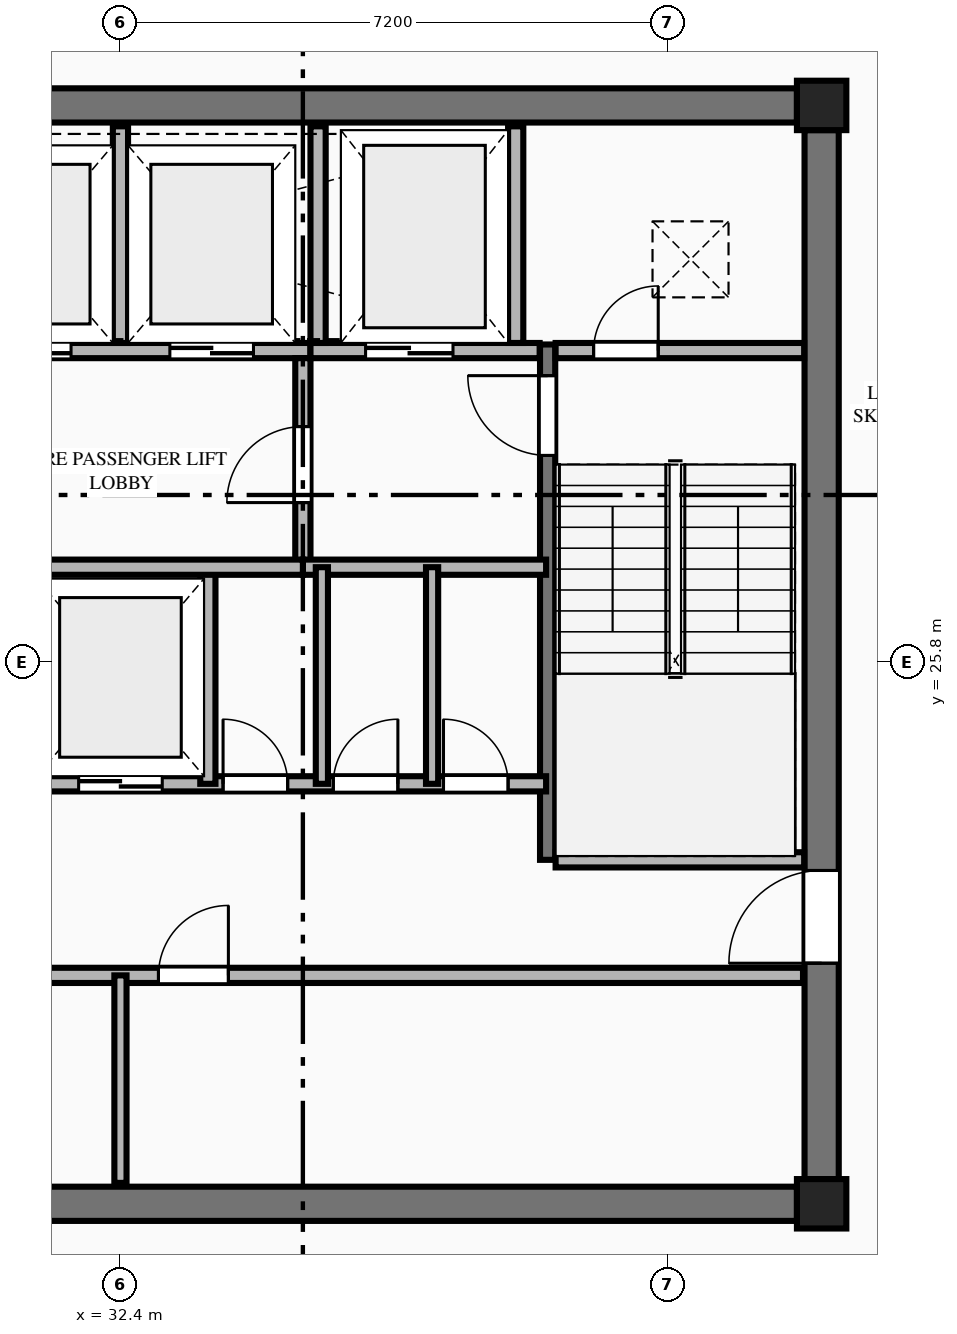
"""IFC4 building model, lengths in metres.
Left out: names, types, materials, properties, quantities, classifications, styles, units other than length and angle.
Written with IfcOpenShell. Run it as: python <this file> out.ifc"""

import sys

from ifc_helpers import new_model, si_unit, direction, frame, frame_2d, origin, origin_2d, place, context, subcontext, project, spatial, rectangle, extrude, element, fill, save


model = new_model("IFC4")
c1 = context("Model", 3, precision=1e-05, world=origin(), true_north=direction((0.0, 1.0)))
c2 = subcontext(c1, "Body", "Model", "MODEL_VIEW")
j1 = project(units=[si_unit("LENGTHUNIT", "METRE"), si_unit("PLANEANGLEUNIT", "RADIAN")], contexts=[c1])
p1 = place(None, origin())
s1 = spatial("IfcSite", under=j1, at=p1, CompositionType="ELEMENT")
p2 = place(p1, origin())
s2 = spatial("IfcBuilding", under=s1, at=p2, CompositionType="ELEMENT")
p3 = place(p2, frame((0.0, 0.0, 270.8)))
s3 = spatial("IfcBuildingStorey", under=s2, at=p3, CompositionType="ELEMENT", Elevation=270.8)
for number, where, z_axis, x_axis in (
    (1, (41.625, 18.675, 0.0), (0.0, 0.0, 1.0), (1.0, 0.0, 0.0)),
    (2, (41.625, 33.125, 0.0), (0.0, 0.0, 1.0), (1.0, 0.0, 0.0)),
):
    element("IfcColumn", number, at=place(p3, frame(where, z_axis=z_axis, x_axis=x_axis)), inside=s3, PredefinedType="COLUMN", context=c2, shape_type="SweptSolid", body=[
        extrude(rectangle(XDim=0.65, YDim=0.65, at=origin_2d()), origin(), (0.0, 0.0, 1.0), 3.65),
    ])
for number, where, z_axis, x_axis in (
    (3, (23.5, 18.675, 0.0), (0.0, 0.0, 1.0), (1.0, 0.0, 0.0)),
    (4, (23.5, 33.125, 0.0), (0.0, 0.0, 1.0), (1.0, 0.0, 0.0)),
):
    element("IfcWall", number, at=place(p3, frame(where, z_axis=z_axis, x_axis=x_axis)), inside=s3, PredefinedType="SHEAR", context=c2, shape_type="SweptSolid", body=[
        extrude(rectangle(XDim=17.8, YDim=0.45, at=frame_2d((8.9, 0.0))), origin(), (0.0, 0.0, 1.0), 3.45),
    ])
p4 = place(p3, frame((41.625, 19.0, 0.0), z_axis=(0.0, 0.0, 1.0), x_axis=(0.0, 1.0, 0.0)))
e5 = element("IfcWall", 5, at=p4, inside=s3, PredefinedType="SHEAR", context=c2, shape_type="SweptSolid", body=[
    extrude(rectangle(XDim=13.8, YDim=0.45, at=frame_2d((6.9, 0.0))), origin(), (0.0, 0.0, 1.0), 3.45),
])
p5 = place(p4, frame((2.84, 0.0, 0.0)))
e6 = element("IfcOpeningElement", 6, at=p5, cuts=e5, PredefinedType="OPENING", context=c2, shape_type="SweptSolid", body=[
    extrude(rectangle(XDim=1.22, YDim=2.25, at=frame_2d((0.61, 1.125))), frame((0.0, 0.235, 0.0), z_axis=(0.0, -1.0, 0.0), x_axis=(1.0, 0.0, 0.0)), (0.0, 0.0, 1.0), 0.47),
])
p6 = place(p3, frame((38.02, 23.2, 0.0), z_axis=(0.0, 0.0, 1.0), x_axis=(0.0, 1.0, 0.0)))
e7 = element("IfcWall", 7, at=p6, inside=s3, PredefinedType="SHEAR", context=c2, shape_type="SweptSolid", body=[
    extrude(rectangle(XDim=6.78, YDim=0.2, at=frame_2d((3.39, 0.0))), origin(), (0.0, 0.0, 1.0), 3.65),
])
p7 = place(p6, frame((5.32, 0.0, 0.0)))
e8 = element("IfcOpeningElement", 8, at=p7, cuts=e7, PredefinedType="OPENING", context=c2, shape_type="SweptSolid", body=[
    extrude(rectangle(XDim=1.05, YDim=2.15, at=frame_2d((0.525, 1.075))), frame((0.0, 0.11, 0.0), z_axis=(0.0, -1.0, 0.0), x_axis=(1.0, 0.0, 0.0)), (0.0, 0.0, 1.0), 0.22),
])
p8 = place(p3, frame((38.125, 23.2, 0.0), z_axis=(0.0, 0.0, 1.0), x_axis=(1.0, 0.0, 0.0)))
e9 = element("IfcWall", 9, at=p8, inside=s3, PredefinedType="PLUMBINGWALL", context=c2, shape_type="SweptSolid", body=[
    extrude(rectangle(XDim=3.27, YDim=0.2, at=frame_2d((1.635, 0.0))), origin(), (0.0, 0.0, 1.0), 3.45),
])
p9 = place(p3, frame((29.9, 29.9, 0.0), z_axis=(0.0, 0.0, 1.0), x_axis=(1.0, 0.0, 0.0)))
e10 = element("IfcWall", 10, at=p9, inside=s3, PredefinedType="PLUMBINGWALL", context=c2, shape_type="SweptSolid", body=[
    extrude(rectangle(XDim=5.0, YDim=0.2, at=frame_2d((2.5, 0.0))), origin(), (0.0, 0.0, 1.0), 3.45),
])
p10 = place(p9, frame((0.75, 0.0, 0.0)))
e11 = element("IfcOpeningElement", 11, at=p10, cuts=e10, PredefinedType="OPENING", context=c2, shape_type="SweptSolid", body=[
    extrude(rectangle(XDim=1.1, YDim=2.2, at=frame_2d((0.55, 1.1))), frame((0.0, 0.11, 0.0), z_axis=(0.0, -1.0, 0.0), x_axis=(1.0, 0.0, 0.0)), (0.0, 0.0, 1.0), 0.22),
])
p11 = place(p9, frame((3.15, 0.0, 0.0)))
e12 = element("IfcOpeningElement", 12, at=p11, cuts=e10, PredefinedType="OPENING", context=c2, shape_type="SweptSolid", body=[
    extrude(rectangle(XDim=1.1, YDim=2.2, at=frame_2d((0.55, 1.1))), frame((0.0, 0.11, 0.0), z_axis=(0.0, -1.0, 0.0), x_axis=(1.0, 0.0, 0.0)), (0.0, 0.0, 1.0), 0.22),
])
p12 = place(p3, frame((34.9, 29.9, 0.0), z_axis=(0.0, 0.0, 1.0), x_axis=(1.0, 0.0, 0.0)))
e13 = element("IfcWall", 13, at=p12, inside=s3, PredefinedType="PLUMBINGWALL", context=c2, shape_type="SweptSolid", body=[
    extrude(rectangle(XDim=3.015, YDim=0.2, at=frame_2d((1.508, 0.0))), origin(), (0.0, 0.0, 1.0), 3.45),
])
p13 = place(p12, frame((0.725, 0.0, 0.0)))
e14 = element("IfcOpeningElement", 14, at=p13, cuts=e13, PredefinedType="OPENING", context=c2, shape_type="SweptSolid", body=[
    extrude(rectangle(XDim=1.15, YDim=2.2, at=frame_2d((0.575, 1.1))), frame((0.0, 0.11, 0.0), z_axis=(0.0, -1.0, 0.0), x_axis=(1.0, 0.0, 0.0)), (0.0, 0.0, 1.0), 0.22),
])
p14 = place(p3, frame((38.125, 29.9, 0.0), z_axis=(0.0, 0.0, 1.0), x_axis=(1.0, 0.0, 0.0)))
e15 = element("IfcWall", 15, at=p14, inside=s3, PredefinedType="PLUMBINGWALL", context=c2, shape_type="SweptSolid", body=[
    extrude(rectangle(XDim=3.27, YDim=0.2, at=frame_2d((1.635, 0.0))), origin(), (0.0, 0.0, 1.0), 3.45),
])
p15 = place(p14, frame((0.5, 0.0, 0.0)))
e16 = element("IfcOpeningElement", 16, at=p15, cuts=e15, PredefinedType="OPENING", context=c2, shape_type="SweptSolid", body=[
    extrude(rectangle(XDim=0.85, YDim=2.05, at=frame_2d((0.425, 1.025))), frame((0.0, 0.11, 0.0), z_axis=(0.0, -1.0, 0.0), x_axis=(1.0, 0.0, 0.0)), (0.0, 0.0, 1.0), 0.22),
])
for number, where, z_axis, x_axis in (
    (17, (32.4, 30.0, 0.0), (0.0, 0.0, 1.0), (0.0, 1.0, 0.0)),
    (18, (35.0, 30.0, 0.0), (0.0, 0.0, 1.0), (0.0, 1.0, 0.0)),
    (19, (37.6, 30.0, 0.0), (0.0, 0.0, 1.0), (0.0, 1.0, 0.0)),
):
    element("IfcWall", number, at=place(p3, frame(where, z_axis=z_axis, x_axis=x_axis)), inside=s3, PredefinedType="PLUMBINGWALL", context=c2, shape_type="SweptSolid", body=[
        extrude(rectangle(XDim=2.85, YDim=0.2, at=frame_2d((1.425, 0.0))), origin(), (0.0, 0.0, 1.0), 3.45),
    ])
p16 = place(p3, frame((34.8, 27.05, 0.0), z_axis=(0.0, 0.0, 1.0), x_axis=(0.0, 1.0, 0.0)))
e20 = element("IfcWall", 20, at=p16, inside=s3, PredefinedType="PLUMBINGWALL", context=c2, shape_type="SweptSolid", body=[
    extrude(rectangle(XDim=2.75, YDim=0.2, at=frame_2d((1.375, 0.0))), origin(), (0.0, 0.0, 1.0), 3.45),
])
p17 = place(p16, frame((0.85, 0.0, 0.0)))
e21 = element("IfcOpeningElement", 21, at=p17, cuts=e20, PredefinedType="OPENING", context=c2, shape_type="SweptSolid", body=[
    extrude(rectangle(XDim=1.0, YDim=2.15, at=frame_2d((0.5, 1.075))), frame((0.0, 0.11, 0.0), z_axis=(0.0, -1.0, 0.0), x_axis=(1.0, 0.0, 0.0)), (0.0, 0.0, 1.0), 0.22),
])
p18 = place(p3, frame((34.8, 27.05, 0.0), z_axis=(0.0, 0.0, 1.0), x_axis=(1.0, 0.0, 0.0)))
e22 = element("IfcWall", 22, at=p18, inside=s3, PredefinedType="PLUMBINGWALL", context=c2, shape_type="SweptSolid", body=[
    extrude(rectangle(XDim=3.2, YDim=0.2, at=frame_2d((1.6, 0.0))), origin(), (0.0, 0.0, 1.0), 3.45),
])
p19 = place(p3, frame((31.2, 24.2, 0.0), z_axis=(0.0, 0.0, 1.0), x_axis=(1.0, 0.0, 0.0)))
e23 = element("IfcWall", 23, at=p19, inside=s3, PredefinedType="PLUMBINGWALL", context=c2, shape_type="SweptSolid", body=[
    extrude(rectangle(XDim=6.8, YDim=0.2, at=frame_2d((3.4, 0.0))), origin(), (0.0, 0.0, 1.0), 3.45),
])
p20 = place(p19, frame((0.65, 0.0, 0.0)))
e24 = element("IfcOpeningElement", 24, at=p20, cuts=e23, PredefinedType="OPENING", context=c2, shape_type="SweptSolid", body=[
    extrude(rectangle(XDim=1.1, YDim=2.2, at=frame_2d((0.55, 1.1))), frame((0.0, 0.11, 0.0), z_axis=(0.0, -1.0, 0.0), x_axis=(1.0, 0.0, 0.0)), (0.0, 0.0, 1.0), 0.22),
])
p21 = place(p19, frame((2.55, 0.0, 0.0)))
e25 = element("IfcOpeningElement", 25, at=p21, cuts=e23, PredefinedType="OPENING", context=c2, shape_type="SweptSolid", body=[
    extrude(rectangle(XDim=0.85, YDim=2.05, at=frame_2d((0.425, 1.025))), frame((0.0, 0.11, 0.0), z_axis=(0.0, -1.0, 0.0), x_axis=(1.0, 0.0, 0.0)), (0.0, 0.0, 1.0), 0.22),
])
p22 = place(p19, frame((4.0, 0.0, 0.0)))
e26 = element("IfcOpeningElement", 26, at=p22, cuts=e23, PredefinedType="OPENING", context=c2, shape_type="SweptSolid", body=[
    extrude(rectangle(XDim=0.85, YDim=2.05, at=frame_2d((0.425, 1.025))), frame((0.0, 0.11, 0.0), z_axis=(0.0, -1.0, 0.0), x_axis=(1.0, 0.0, 0.0)), (0.0, 0.0, 1.0), 0.22),
])
p23 = place(p19, frame((5.45, 0.0, 0.0)))
e27 = element("IfcOpeningElement", 27, at=p23, cuts=e23, PredefinedType="OPENING", context=c2, shape_type="SweptSolid", body=[
    extrude(rectangle(XDim=0.85, YDim=2.05, at=frame_2d((0.425, 1.025))), frame((0.0, 0.11, 0.0), z_axis=(0.0, -1.0, 0.0), x_axis=(1.0, 0.0, 0.0)), (0.0, 0.0, 1.0), 0.22),
])
p24 = place(p3, frame((33.55, 24.2, 0.0), z_axis=(0.0, 0.0, 1.0), x_axis=(0.0, 1.0, 0.0)))
e28 = element("IfcWall", 28, at=p24, inside=s3, PredefinedType="PLUMBINGWALL", context=c2, shape_type="SweptSolid", body=[
    extrude(rectangle(XDim=2.85, YDim=0.2, at=frame_2d((1.425, 0.0))), origin(), (0.0, 0.0, 1.0), 3.45),
])
p25 = place(p3, frame((31.25, 27.05, 0.0), z_axis=(0.0, 0.0, 1.0), x_axis=(1.0, 0.0, 0.0)))
e29 = element("IfcWall", 29, at=p25, inside=s3, PredefinedType="PLUMBINGWALL", context=c2, shape_type="SweptSolid", body=[
    extrude(rectangle(XDim=3.55, YDim=0.2, at=frame_2d((1.775, 0.0))), origin(), (0.0, 0.0, 1.0), 3.45),
])
for number, where, z_axis, x_axis in (
    (30, (35.05, 24.2, 0.0), (0.0, 0.0, 1.0), (0.0, 1.0, 0.0)),
    (31, (36.5, 24.2, 0.0), (0.0, 0.0, 1.0), (0.0, 1.0, 0.0)),
):
    element("IfcWall", number, at=place(p3, frame(where, z_axis=z_axis, x_axis=x_axis)), inside=s3, PredefinedType="PARTITIONING", context=c2, shape_type="SweptSolid", body=[
        extrude(rectangle(XDim=2.85, YDim=0.16, at=frame_2d((1.425, 0.0))), origin(), (0.0, 0.0, 1.0), 3.45),
    ])
p26 = place(p3, frame((23.42, 21.68, 0.0), z_axis=(0.0, 0.0, 1.0), x_axis=(1.0, 0.0, 0.0)))
e32 = element("IfcWall", 32, at=p26, inside=s3, PredefinedType="PLUMBINGWALL", context=c2, shape_type="SweptSolid", body=[
    extrude(rectangle(XDim=17.96, YDim=0.2, at=frame_2d((8.98, 0.0))), origin(), (0.0, 0.0, 1.0), 3.45),
])
p27 = place(p26, frame((0.46, 0.0, 0.0)))
e33 = element("IfcOpeningElement", 33, at=p27, cuts=e32, PredefinedType="OPENING", context=c2, shape_type="SweptSolid", body=[
    extrude(rectangle(XDim=0.92, YDim=2.15, at=frame_2d((0.46, 1.075))), frame((0.0, 0.11, 0.0), z_axis=(0.0, -1.0, 0.0), x_axis=(1.0, 0.0, 0.0)), (0.0, 0.0, 1.0), 0.22),
])
p28 = place(p26, frame((9.48, 0.0, 0.0)))
e34 = element("IfcOpeningElement", 34, at=p28, cuts=e32, PredefinedType="OPENING", context=c2, shape_type="SweptSolid", body=[
    extrude(rectangle(XDim=0.92, YDim=2.15, at=frame_2d((0.46, 1.075))), frame((0.0, 0.11, 0.0), z_axis=(0.0, -1.0, 0.0), x_axis=(1.0, 0.0, 0.0)), (0.0, 0.0, 1.0), 0.22),
])
p29 = place(p3, frame((32.4, 18.95, 0.0), z_axis=(0.0, 0.0, 1.0), x_axis=(0.0, 1.0, 0.0)))
e35 = element("IfcWall", 35, at=p29, inside=s3, PredefinedType="PARTITIONING", context=c2, shape_type="SweptSolid", body=[
    extrude(rectangle(XDim=2.73, YDim=0.16, at=frame_2d((1.365, 0.0))), origin(), (0.0, 0.0, 1.0), 3.45),
])
p30 = place(p5, origin())
e36 = element("IfcDoor", 36, at=p30, inside=s3, OperationType="SINGLE_SWING_LEFT", PredefinedType="DOOR", context=c2, shape_type="SweptSolid", body=[
    extrude(rectangle(XDim=1.22, YDim=2.25, at=frame_2d((0.61, 1.125))), frame((0.0, 0.025, 0.0), z_axis=(0.0, -1.0, 0.0), x_axis=(1.0, 0.0, 0.0)), (0.0, 0.0, 1.0), 0.05),
])
fill(e6, e36)
p31 = place(p7, origin())
e37 = element("IfcDoor", 37, at=p31, inside=s3, OperationType="SINGLE_SWING_RIGHT", PredefinedType="DOOR", context=c2, shape_type="SweptSolid", body=[
    extrude(rectangle(XDim=1.05, YDim=2.15, at=frame_2d((0.525, 1.075))), frame((0.0, 0.025, 0.0), z_axis=(0.0, -1.0, 0.0), x_axis=(1.0, 0.0, 0.0)), (0.0, 0.0, 1.0), 0.05),
])
fill(e8, e37)
p32 = place(p15, origin())
e38 = element("IfcDoor", 38, at=p32, inside=s3, OperationType="SINGLE_SWING_RIGHT", PredefinedType="DOOR", context=c2, shape_type="SweptSolid", body=[
    extrude(rectangle(XDim=0.85, YDim=2.05, at=frame_2d((0.425, 1.025))), frame((0.0, 0.025, 0.0), z_axis=(0.0, -1.0, 0.0), x_axis=(1.0, 0.0, 0.0)), (0.0, 0.0, 1.0), 0.05),
])
fill(e16, e38)
p33 = place(p13, origin())
e39 = element("IfcDoor", 39, at=p33, inside=s3, OperationType="DOUBLE_DOOR_SLIDING", PredefinedType="DOOR", context=c2, shape_type="SweptSolid", body=[
    extrude(rectangle(XDim=1.15, YDim=2.2, at=frame_2d((0.575, 1.1))), frame((0.0, 0.025, 0.0), z_axis=(0.0, -1.0, 0.0), x_axis=(1.0, 0.0, 0.0)), (0.0, 0.0, 1.0), 0.05),
])
fill(e14, e39)
p34 = place(p10, origin())
e40 = element("IfcDoor", 40, at=p34, inside=s3, OperationType="DOUBLE_DOOR_SLIDING", PredefinedType="DOOR", context=c2, shape_type="SweptSolid", body=[
    extrude(rectangle(XDim=1.1, YDim=2.2, at=frame_2d((0.55, 1.1))), frame((0.0, 0.025, 0.0), z_axis=(0.0, -1.0, 0.0), x_axis=(1.0, 0.0, 0.0)), (0.0, 0.0, 1.0), 0.05),
])
fill(e11, e40)
p35 = place(p11, origin())
e41 = element("IfcDoor", 41, at=p35, inside=s3, OperationType="DOUBLE_DOOR_SLIDING", PredefinedType="DOOR", context=c2, shape_type="SweptSolid", body=[
    extrude(rectangle(XDim=1.1, YDim=2.2, at=frame_2d((0.55, 1.1))), frame((0.0, 0.025, 0.0), z_axis=(0.0, -1.0, 0.0), x_axis=(1.0, 0.0, 0.0)), (0.0, 0.0, 1.0), 0.05),
])
fill(e12, e41)
p36 = place(p17, origin())
e42 = element("IfcDoor", 42, at=p36, inside=s3, OperationType="SINGLE_SWING_LEFT", PredefinedType="DOOR", context=c2, shape_type="SweptSolid", body=[
    extrude(rectangle(XDim=1.0, YDim=2.15, at=frame_2d((0.5, 1.075))), frame((0.0, 0.025, 0.0), z_axis=(0.0, -1.0, 0.0), x_axis=(1.0, 0.0, 0.0)), (0.0, 0.0, 1.0), 0.05),
])
fill(e21, e42)
p37 = place(p20, origin())
e43 = element("IfcDoor", 43, at=p37, inside=s3, OperationType="DOUBLE_DOOR_SLIDING", PredefinedType="DOOR", context=c2, shape_type="SweptSolid", body=[
    extrude(rectangle(XDim=1.1, YDim=2.2, at=frame_2d((0.55, 1.1))), frame((0.0, 0.025, 0.0), z_axis=(0.0, -1.0, 0.0), x_axis=(1.0, 0.0, 0.0)), (0.0, 0.0, 1.0), 0.05),
])
fill(e24, e43)
p38 = place(p21, origin())
e44 = element("IfcDoor", 44, at=p38, inside=s3, OperationType="SINGLE_SWING_LEFT", PredefinedType="DOOR", context=c2, shape_type="SweptSolid", body=[
    extrude(rectangle(XDim=0.85, YDim=2.05, at=frame_2d((0.425, 1.025))), frame((0.0, 0.025, 0.0), z_axis=(0.0, -1.0, 0.0), x_axis=(1.0, 0.0, 0.0)), (0.0, 0.0, 1.0), 0.05),
])
fill(e25, e44)
p39 = place(p22, origin())
e45 = element("IfcDoor", 45, at=p39, inside=s3, OperationType="SINGLE_SWING_RIGHT", PredefinedType="DOOR", context=c2, shape_type="SweptSolid", body=[
    extrude(rectangle(XDim=0.85, YDim=2.05, at=frame_2d((0.425, 1.025))), frame((0.0, 0.025, 0.0), z_axis=(0.0, -1.0, 0.0), x_axis=(1.0, 0.0, 0.0)), (0.0, 0.0, 1.0), 0.05),
])
fill(e26, e45)
p40 = place(p23, origin())
e46 = element("IfcDoor", 46, at=p40, inside=s3, OperationType="SINGLE_SWING_LEFT", PredefinedType="DOOR", context=c2, shape_type="SweptSolid", body=[
    extrude(rectangle(XDim=0.85, YDim=2.05, at=frame_2d((0.425, 1.025))), frame((0.0, 0.025, 0.0), z_axis=(0.0, -1.0, 0.0), x_axis=(1.0, 0.0, 0.0)), (0.0, 0.0, 1.0), 0.05),
])
fill(e27, e46)
p41 = place(p28, origin())
e47 = element("IfcDoor", 47, at=p41, inside=s3, OperationType="SINGLE_SWING_RIGHT", PredefinedType="DOOR", context=c2, shape_type="SweptSolid", body=[
    extrude(rectangle(XDim=0.92, YDim=2.15, at=frame_2d((0.46, 1.075))), frame((0.0, 0.025, 0.0), z_axis=(0.0, -1.0, 0.0), x_axis=(1.0, 0.0, 0.0)), (0.0, 0.0, 1.0), 0.05),
])
fill(e34, e47)
save(model, sys.argv[1])
